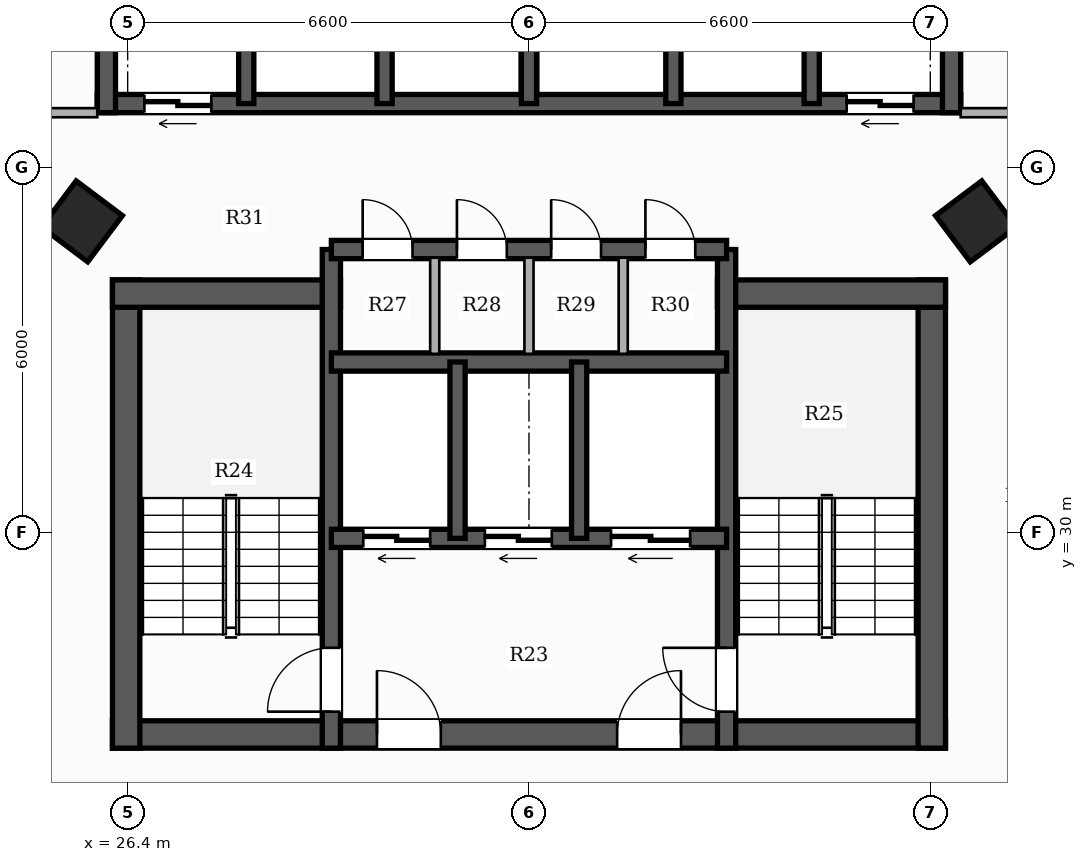
"""IFC4 building model, lengths in metres.
Left out: names, types, materials, properties, quantities, classifications, styles, units other than length and angle.
Written with IfcOpenShell. Run it as: python <this file> out.ifc"""

import sys

from ifc_helpers import new_model, si_unit, direction, frame, frame_2d, origin, origin_2d, place, context, subcontext, project, spatial, rectangle, hollow_rectangle, extrude, element, fill, save


model = new_model("IFC4")
c1 = context("Model", 3, precision=1e-05, world=origin(), true_north=direction((0.0, 1.0)))
c2 = subcontext(c1, "Body", "Model", "MODEL_VIEW")
j1 = project(units=[si_unit("LENGTHUNIT", "METRE"), si_unit("PLANEANGLEUNIT", "RADIAN")], contexts=[c1])
p1 = place(None, origin())
s1 = spatial("IfcSite", under=j1, at=p1, CompositionType="ELEMENT")
p2 = place(p1, origin())
s2 = spatial("IfcBuilding", under=s1, at=p2, CompositionType="ELEMENT")
p3 = place(p2, frame((0.0, 0.0, 46.7)))
s3 = spatial("IfcBuildingStorey", under=s2, at=p3, CompositionType="ELEMENT", Elevation=46.7)
p4 = place(p3, frame((26.15, 26.675, 0.0), z_axis=(0.0, 0.0, 1.0), x_axis=(1.0, 0.0, 0.0)))
e1 = element("IfcWall", 1, at=p4, inside=s3, PredefinedType="SHEAR", context=c2, shape_type="SweptSolid", body=[
    extrude(rectangle(XDim=13.7, YDim=0.45, at=frame_2d((6.85, 0.0))), origin(), (0.0, 0.0, 1.0), 3.3),
])
p5 = place(p4, frame((4.35, 0.0, 0.0)))
e2 = element("IfcOpeningElement", 2, at=p5, cuts=e1, PredefinedType="OPENING", context=c2, shape_type="SweptSolid", body=[
    extrude(rectangle(XDim=1.05, YDim=2.15, at=frame_2d((0.525, 1.075))), frame((0.0, 0.235, 0.0), z_axis=(0.0, -1.0, 0.0), x_axis=(1.0, 0.0, 0.0)), (0.0, 0.0, 1.0), 0.47),
])
p6 = place(p4, frame((8.3, 0.0, 0.0)))
e3 = element("IfcOpeningElement", 3, at=p6, cuts=e1, PredefinedType="OPENING", context=c2, shape_type="SweptSolid", body=[
    extrude(rectangle(XDim=1.05, YDim=2.15, at=frame_2d((0.525, 1.075))), frame((0.0, 0.235, 0.0), z_axis=(0.0, -1.0, 0.0), x_axis=(1.0, 0.0, 0.0)), (0.0, 0.0, 1.0), 0.47),
])
p7 = place(p3, frame((26.375, 26.45, 0.0), z_axis=(0.0, 0.0, 1.0), x_axis=(0.0, 1.0, 0.0)))
e4 = element("IfcWall", 4, at=p7, inside=s3, PredefinedType="SHEAR", context=c2, shape_type="SweptSolid", body=[
    extrude(rectangle(XDim=7.7, YDim=0.45, at=frame_2d((3.85, 0.0))), origin(), (0.0, 0.0, 1.0), 3.3),
])
p8 = place(p3, frame((26.15, 33.925, 0.0), z_axis=(0.0, 0.0, 1.0), x_axis=(1.0, 0.0, 0.0)))
e5 = element("IfcWall", 5, at=p8, inside=s3, PredefinedType="SHEAR", context=c2, shape_type="SweptSolid", body=[
    extrude(rectangle(XDim=3.75, YDim=0.45, at=frame_2d((1.875, 0.0))), origin(), (0.0, 0.0, 1.0), 3.3),
])
p9 = place(p3, frame((39.625, 26.45, 0.0), z_axis=(0.0, 0.0, 1.0), x_axis=(0.0, 1.0, 0.0)))
e6 = element("IfcWall", 6, at=p9, inside=s3, PredefinedType="SHEAR", context=c2, shape_type="SweptSolid", body=[
    extrude(rectangle(XDim=7.7, YDim=0.45, at=frame_2d((3.85, 0.0))), origin(), (0.0, 0.0, 1.0), 3.3),
])
p10 = place(p3, frame((36.1, 33.925, 0.0), z_axis=(0.0, 0.0, 1.0), x_axis=(1.0, 0.0, 0.0)))
e7 = element("IfcWall", 7, at=p10, inside=s3, PredefinedType="SHEAR", context=c2, shape_type="SweptSolid", body=[
    extrude(rectangle(XDim=3.75, YDim=0.45, at=frame_2d((1.875, 0.0))), origin(), (0.0, 0.0, 1.0), 3.3),
])
p11 = place(p3, frame((29.75, 26.45, 0.0), z_axis=(0.0, 0.0, 1.0), x_axis=(0.0, 1.0, 0.0)))
e8 = element("IfcWall", 8, at=p11, inside=s3, PredefinedType="SHEAR", context=c2, shape_type="SweptSolid", body=[
    extrude(rectangle(XDim=8.2, YDim=0.3, at=frame_2d((4.1, 0.0))), origin(), (0.0, 0.0, 1.0), 3.3),
])
p12 = place(p11, frame((0.6, 0.0, 0.0)))
e9 = element("IfcOpeningElement", 9, at=p12, cuts=e8, PredefinedType="OPENING", context=c2, shape_type="SweptSolid", body=[
    extrude(rectangle(XDim=1.05, YDim=2.15, at=frame_2d((0.525, 1.075))), frame((0.0, 0.16, 0.0), z_axis=(0.0, -1.0, 0.0), x_axis=(1.0, 0.0, 0.0)), (0.0, 0.0, 1.0), 0.32),
])
p13 = place(p3, frame((36.25, 26.45, 0.0), z_axis=(0.0, 0.0, 1.0), x_axis=(0.0, 1.0, 0.0)))
e10 = element("IfcWall", 10, at=p13, inside=s3, PredefinedType="SHEAR", context=c2, shape_type="SweptSolid", body=[
    extrude(rectangle(XDim=8.2, YDim=0.3, at=frame_2d((4.1, 0.0))), origin(), (0.0, 0.0, 1.0), 3.3),
])
p14 = place(p13, frame((0.6, 0.0, 0.0)))
e11 = element("IfcOpeningElement", 11, at=p14, cuts=e10, PredefinedType="OPENING", context=c2, shape_type="SweptSolid", body=[
    extrude(rectangle(XDim=1.05, YDim=2.15, at=frame_2d((0.525, 1.075))), frame((0.0, 0.16, 0.0), z_axis=(0.0, -1.0, 0.0), x_axis=(1.0, 0.0, 0.0)), (0.0, 0.0, 1.0), 0.32),
])
p15 = place(p3, frame((36.25, 29.9, 0.0), z_axis=(0.0, 0.0, 1.0), x_axis=(-1.0, 0.0, 0.0)))
e12 = element("IfcWall", 12, at=p15, inside=s3, PredefinedType="SHEAR", context=c2, shape_type="SweptSolid", body=[
    extrude(rectangle(XDim=6.5, YDim=0.3, at=frame_2d((3.25, 0.0))), origin(), (0.0, 0.0, 1.0), 3.3),
])
p16 = place(p15, frame((4.875, 0.0, 0.0)))
e13 = element("IfcOpeningElement", 13, at=p16, cuts=e12, PredefinedType="OPENING", context=c2, shape_type="SweptSolid", body=[
    extrude(rectangle(XDim=1.1, YDim=2.2, at=frame_2d((0.55, 1.1))), frame((0.0, 0.16, 0.0), z_axis=(0.0, -1.0, 0.0), x_axis=(1.0, 0.0, 0.0)), (0.0, 0.0, 1.0), 0.32),
])
p17 = place(p15, frame((2.875, 0.0, 0.0)))
e14 = element("IfcOpeningElement", 14, at=p17, cuts=e12, PredefinedType="OPENING", context=c2, shape_type="SweptSolid", body=[
    extrude(rectangle(XDim=1.1, YDim=2.2, at=frame_2d((0.55, 1.1))), frame((0.0, 0.16, 0.0), z_axis=(0.0, -1.0, 0.0), x_axis=(1.0, 0.0, 0.0)), (0.0, 0.0, 1.0), 0.32),
])
p18 = place(p15, frame((0.6, 0.0, 0.0)))
e15 = element("IfcOpeningElement", 15, at=p18, cuts=e12, PredefinedType="OPENING", context=c2, shape_type="SweptSolid", body=[
    extrude(rectangle(XDim=1.3, YDim=2.2, at=frame_2d((0.65, 1.1))), frame((0.0, 0.16, 0.0), z_axis=(0.0, -1.0, 0.0), x_axis=(1.0, 0.0, 0.0)), (0.0, 0.0, 1.0), 0.32),
])
p19 = place(p3, frame((29.75, 32.8, 0.0), z_axis=(0.0, 0.0, 1.0), x_axis=(1.0, 0.0, 0.0)))
e16 = element("IfcWall", 16, at=p19, inside=s3, PredefinedType="SHEAR", context=c2, shape_type="SweptSolid", body=[
    extrude(rectangle(XDim=6.5, YDim=0.3, at=frame_2d((3.25, 0.0))), origin(), (0.0, 0.0, 1.0), 3.3),
])
for number, where, z_axis, x_axis in (
    (17, (31.825, 29.9, 0.0), (0.0, 0.0, 1.0), (0.0, 1.0, 0.0)),
    (18, (33.825, 29.9, 0.0), (0.0, 0.0, 1.0), (0.0, 1.0, 0.0)),
):
    element("IfcWall", number, at=place(p3, frame(where, z_axis=z_axis, x_axis=x_axis)), inside=s3, PredefinedType="SHEAR", context=c2, shape_type="SweptSolid", body=[
        extrude(rectangle(XDim=2.9, YDim=0.25, at=frame_2d((1.45, 0.0))), origin(), (0.0, 0.0, 1.0), 3.3),
    ])
p20 = place(p3, frame((29.75, 34.65, 0.0), z_axis=(0.0, 0.0, 1.0), x_axis=(1.0, 0.0, 0.0)))
e19 = element("IfcWall", 19, at=p20, inside=s3, PredefinedType="SHEAR", context=c2, shape_type="SweptSolid", body=[
    extrude(rectangle(XDim=6.5, YDim=0.3, at=frame_2d((3.25, 0.0))), origin(), (0.0, 0.0, 1.0), 3.3),
])
p21 = place(p20, frame((0.515, 0.0, 0.0)))
e20 = element("IfcOpeningElement", 20, at=p21, cuts=e19, PredefinedType="OPENING", context=c2, shape_type="SweptSolid", body=[
    extrude(rectangle(XDim=0.82, YDim=2.1, at=frame_2d((0.41, 1.05))), frame((0.0, 0.16, 0.0), z_axis=(0.0, -1.0, 0.0), x_axis=(1.0, 0.0, 0.0)), (0.0, 0.0, 1.0), 0.32),
])
p22 = place(p20, frame((2.065, 0.0, 0.0)))
e21 = element("IfcOpeningElement", 21, at=p22, cuts=e19, PredefinedType="OPENING", context=c2, shape_type="SweptSolid", body=[
    extrude(rectangle(XDim=0.82, YDim=2.1, at=frame_2d((0.41, 1.05))), frame((0.0, 0.16, 0.0), z_axis=(0.0, -1.0, 0.0), x_axis=(1.0, 0.0, 0.0)), (0.0, 0.0, 1.0), 0.32),
])
p23 = place(p20, frame((3.615, 0.0, 0.0)))
e22 = element("IfcOpeningElement", 22, at=p23, cuts=e19, PredefinedType="OPENING", context=c2, shape_type="SweptSolid", body=[
    extrude(rectangle(XDim=0.82, YDim=2.1, at=frame_2d((0.41, 1.05))), frame((0.0, 0.16, 0.0), z_axis=(0.0, -1.0, 0.0), x_axis=(1.0, 0.0, 0.0)), (0.0, 0.0, 1.0), 0.32),
])
p24 = place(p20, frame((5.165, 0.0, 0.0)))
e23 = element("IfcOpeningElement", 23, at=p24, cuts=e19, PredefinedType="OPENING", context=c2, shape_type="SweptSolid", body=[
    extrude(rectangle(XDim=0.82, YDim=2.1, at=frame_2d((0.41, 1.05))), frame((0.0, 0.16, 0.0), z_axis=(0.0, -1.0, 0.0), x_axis=(1.0, 0.0, 0.0)), (0.0, 0.0, 1.0), 0.32),
])
p25 = place(p3, frame((40.1, 37.05, 0.0), z_axis=(0.0, 0.0, 1.0), x_axis=(-1.0, 0.0, 0.0)))
e24 = element("IfcWall", 24, at=p25, inside=s3, PredefinedType="SHEAR", context=c2, shape_type="SweptSolid", body=[
    extrude(rectangle(XDim=14.2, YDim=0.3, at=frame_2d((7.1, 0.0))), origin(), (0.0, 0.0, 1.0), 3.3),
])
p26 = place(p25, frame((12.325, 0.0, 0.0)))
e25 = element("IfcOpeningElement", 25, at=p26, cuts=e24, PredefinedType="OPENING", context=c2, shape_type="SweptSolid", body=[
    extrude(rectangle(XDim=1.1, YDim=2.2, at=frame_2d((0.55, 1.1))), frame((0.0, 0.16, 0.0), z_axis=(0.0, -1.0, 0.0), x_axis=(1.0, 0.0, 0.0)), (0.0, 0.0, 1.0), 0.32),
])
p27 = place(p25, frame((0.775, 0.0, 0.0)))
e26 = element("IfcOpeningElement", 26, at=p27, cuts=e24, PredefinedType="OPENING", context=c2, shape_type="SweptSolid", body=[
    extrude(rectangle(XDim=1.1, YDim=2.2, at=frame_2d((0.55, 1.1))), frame((0.0, 0.16, 0.0), z_axis=(0.0, -1.0, 0.0), x_axis=(1.0, 0.0, 0.0)), (0.0, 0.0, 1.0), 0.32),
])
for number, where, z_axis, x_axis in (
    (27, (26.05, 36.9, 0.0), (0.0, 0.0, 1.0), (0.0, 1.0, 0.0)),
    (28, (39.95, 36.9, 0.0), (0.0, 0.0, 1.0), (0.0, 1.0, 0.0)),
):
    element("IfcWall", number, at=place(p3, frame(where, z_axis=z_axis, x_axis=x_axis)), inside=s3, PredefinedType="SHEAR", context=c2, shape_type="SweptSolid", body=[
        extrude(rectangle(XDim=2.85, YDim=0.3, at=frame_2d((1.425, 0.0))), origin(), (0.0, 0.0, 1.0), 3.3),
    ])
for number, where, z_axis, x_axis in (
    (29, (28.35, 37.05, 0.0), (0.0, 0.0, 1.0), (0.0, 1.0, 0.0)),
    (30, (30.625, 37.05, 0.0), (0.0, 0.0, 1.0), (0.0, 1.0, 0.0)),
    (31, (33.0, 37.05, 0.0), (0.0, 0.0, 1.0), (0.0, 1.0, 0.0)),
    (32, (35.375, 37.05, 0.0), (0.0, 0.0, 1.0), (0.0, 1.0, 0.0)),
    (33, (37.65, 37.05, 0.0), (0.0, 0.0, 1.0), (0.0, 1.0, 0.0)),
):
    element("IfcWall", number, at=place(p3, frame(where, z_axis=z_axis, x_axis=x_axis)), inside=s3, PredefinedType="SHEAR", context=c2, shape_type="SweptSolid", body=[
        extrude(rectangle(XDim=2.55, YDim=0.25, at=frame_2d((1.275, 0.0))), origin(), (0.0, 0.0, 1.0), 3.3),
    ])
for number, where, z_axis, x_axis in (
    (34, (25.648, 35.113, 0.0), (0.0, 0.0, 1.0), (0.6, 0.8, 0.0)),
    (35, (40.352, 35.113, 0.0), (0.0, 0.0, 1.0), (-0.6, 0.8, 0.0)),
):
    element("IfcColumn", number, at=place(p3, frame(where, z_axis=z_axis, x_axis=x_axis)), inside=s3, PredefinedType="COLUMN", context=c2, shape_type="SweptSolid", body=[
        extrude(hollow_rectangle(XDim=0.95, YDim=0.95, WallThickness=0.032, at=origin_2d()), origin(), (0.0, 0.0, 1.0), 3.3),
    ])
for number, where, z_axis, x_axis in (
    (36, (31.45, 32.935, 0.0), (0.0, 0.0, 1.0), (0.0, 1.0, 0.0)),
    (37, (33.0, 32.935, 0.0), (0.0, 0.0, 1.0), (0.0, 1.0, 0.0)),
    (38, (34.55, 32.935, 0.0), (0.0, 0.0, 1.0), (0.0, 1.0, 0.0)),
):
    element("IfcWall", number, at=place(p3, frame(where, z_axis=z_axis, x_axis=x_axis)), inside=s3, PredefinedType="PARTITIONING", context=c2, shape_type="SweptSolid", body=[
        extrude(rectangle(XDim=1.58, YDim=0.15, at=frame_2d((0.79, 0.0))), origin(), (0.0, 0.0, 1.0), 3.06),
    ])
p28 = place(p3, frame((40.1, 36.9, 0.0), z_axis=(0.0, 0.0, 1.0), x_axis=(1.0, 0.0, 0.0)))
e39 = element("IfcWall", 39, at=p28, inside=s3, PredefinedType="PARTITIONING", context=c2, shape_type="SweptSolid", body=[
    extrude(rectangle(XDim=2.55, YDim=0.15, at=frame_2d((1.275, 0.0))), origin(), (0.0, 0.0, 1.0), 2.413),
])
p29 = place(p3, frame((23.41, 36.9, 0.0), z_axis=(0.0, 0.0, 1.0), x_axis=(1.0, 0.0, 0.0)))
e40 = element("IfcWall", 40, at=p29, inside=s3, PredefinedType="PARTITIONING", context=c2, shape_type="SweptSolid", body=[
    extrude(rectangle(XDim=2.49, YDim=0.15, at=frame_2d((1.245, 0.0))), origin(), (0.0, 0.0, 1.0), 2.413),
])
p30 = place(p12, origin())
e41 = element("IfcDoor", 41, at=p30, inside=s3, OperationType="SINGLE_SWING_LEFT", PredefinedType="DOOR", context=c2, shape_type="SweptSolid", body=[
    extrude(rectangle(XDim=1.05, YDim=2.15, at=frame_2d((0.525, 1.075))), frame((0.0, 0.025, 0.0), z_axis=(0.0, -1.0, 0.0), x_axis=(1.0, 0.0, 0.0)), (0.0, 0.0, 1.0), 0.05),
])
fill(e9, e41)
p31 = place(p14, origin())
e42 = element("IfcDoor", 42, at=p31, inside=s3, OperationType="SINGLE_SWING_RIGHT", PredefinedType="DOOR", context=c2, shape_type="SweptSolid", body=[
    extrude(rectangle(XDim=1.05, YDim=2.15, at=frame_2d((0.525, 1.075))), frame((0.0, 0.025, 0.0), z_axis=(0.0, -1.0, 0.0), x_axis=(1.0, 0.0, 0.0)), (0.0, 0.0, 1.0), 0.05),
])
fill(e11, e42)
p32 = place(p5, origin())
e43 = element("IfcDoor", 43, at=p32, inside=s3, OperationType="SINGLE_SWING_LEFT", PredefinedType="DOOR", context=c2, shape_type="SweptSolid", body=[
    extrude(rectangle(XDim=1.05, YDim=2.15, at=frame_2d((0.525, 1.075))), frame((0.0, 0.025, 0.0), z_axis=(0.0, -1.0, 0.0), x_axis=(1.0, 0.0, 0.0)), (0.0, 0.0, 1.0), 0.05),
])
fill(e2, e43)
p33 = place(p6, origin())
e44 = element("IfcDoor", 44, at=p33, inside=s3, OperationType="SINGLE_SWING_RIGHT", PredefinedType="DOOR", context=c2, shape_type="SweptSolid", body=[
    extrude(rectangle(XDim=1.05, YDim=2.15, at=frame_2d((0.525, 1.075))), frame((0.0, 0.025, 0.0), z_axis=(0.0, -1.0, 0.0), x_axis=(1.0, 0.0, 0.0)), (0.0, 0.0, 1.0), 0.05),
])
fill(e3, e44)
p34 = place(p16, origin())
e45 = element("IfcDoor", 45, at=p34, inside=s3, OperationType="DOUBLE_DOOR_SLIDING", PredefinedType="DOOR", context=c2, shape_type="SweptSolid", body=[
    extrude(rectangle(XDim=1.1, YDim=2.2, at=frame_2d((0.55, 1.1))), frame((0.0, 0.025, 0.0), z_axis=(0.0, -1.0, 0.0), x_axis=(1.0, 0.0, 0.0)), (0.0, 0.0, 1.0), 0.05),
])
fill(e13, e45)
p35 = place(p17, origin())
e46 = element("IfcDoor", 46, at=p35, inside=s3, OperationType="DOUBLE_DOOR_SLIDING", PredefinedType="DOOR", context=c2, shape_type="SweptSolid", body=[
    extrude(rectangle(XDim=1.1, YDim=2.2, at=frame_2d((0.55, 1.1))), frame((0.0, 0.025, 0.0), z_axis=(0.0, -1.0, 0.0), x_axis=(1.0, 0.0, 0.0)), (0.0, 0.0, 1.0), 0.05),
])
fill(e14, e46)
p36 = place(p18, origin())
e47 = element("IfcDoor", 47, at=p36, inside=s3, OperationType="DOUBLE_DOOR_SLIDING", PredefinedType="DOOR", context=c2, shape_type="SweptSolid", body=[
    extrude(rectangle(XDim=1.3, YDim=2.2, at=frame_2d((0.65, 1.1))), frame((0.0, 0.025, 0.0), z_axis=(0.0, -1.0, 0.0), x_axis=(1.0, 0.0, 0.0)), (0.0, 0.0, 1.0), 0.05),
])
fill(e15, e47)
p37 = place(p26, origin())
e48 = element("IfcDoor", 48, at=p37, inside=s3, OperationType="DOUBLE_DOOR_SLIDING", PredefinedType="DOOR", context=c2, shape_type="SweptSolid", body=[
    extrude(rectangle(XDim=1.1, YDim=2.2, at=frame_2d((0.55, 1.1))), frame((0.0, 0.025, 0.0), z_axis=(0.0, -1.0, 0.0), x_axis=(1.0, 0.0, 0.0)), (0.0, 0.0, 1.0), 0.05),
])
fill(e25, e48)
p38 = place(p27, origin())
e49 = element("IfcDoor", 49, at=p38, inside=s3, OperationType="DOUBLE_DOOR_SLIDING", PredefinedType="DOOR", context=c2, shape_type="SweptSolid", body=[
    extrude(rectangle(XDim=1.1, YDim=2.2, at=frame_2d((0.55, 1.1))), frame((0.0, 0.025, 0.0), z_axis=(0.0, -1.0, 0.0), x_axis=(1.0, 0.0, 0.0)), (0.0, 0.0, 1.0), 0.05),
])
fill(e26, e49)
p39 = place(p21, origin())
e50 = element("IfcDoor", 50, at=p39, inside=s3, OperationType="SINGLE_SWING_LEFT", PredefinedType="DOOR", context=c2, shape_type="SweptSolid", body=[
    extrude(rectangle(XDim=0.82, YDim=2.1, at=frame_2d((0.41, 1.05))), frame((0.0, 0.025, 0.0), z_axis=(0.0, -1.0, 0.0), x_axis=(1.0, 0.0, 0.0)), (0.0, 0.0, 1.0), 0.05),
])
fill(e20, e50)
p40 = place(p22, origin())
e51 = element("IfcDoor", 51, at=p40, inside=s3, OperationType="SINGLE_SWING_LEFT", PredefinedType="DOOR", context=c2, shape_type="SweptSolid", body=[
    extrude(rectangle(XDim=0.82, YDim=2.1, at=frame_2d((0.41, 1.05))), frame((0.0, 0.025, 0.0), z_axis=(0.0, -1.0, 0.0), x_axis=(1.0, 0.0, 0.0)), (0.0, 0.0, 1.0), 0.05),
])
fill(e21, e51)
p41 = place(p23, origin())
e52 = element("IfcDoor", 52, at=p41, inside=s3, OperationType="SINGLE_SWING_LEFT", PredefinedType="DOOR", context=c2, shape_type="SweptSolid", body=[
    extrude(rectangle(XDim=0.82, YDim=2.1, at=frame_2d((0.41, 1.05))), frame((0.0, 0.025, 0.0), z_axis=(0.0, -1.0, 0.0), x_axis=(1.0, 0.0, 0.0)), (0.0, 0.0, 1.0), 0.05),
])
fill(e22, e52)
p42 = place(p24, origin())
e53 = element("IfcDoor", 53, at=p42, inside=s3, OperationType="SINGLE_SWING_LEFT", PredefinedType="DOOR", context=c2, shape_type="SweptSolid", body=[
    extrude(rectangle(XDim=0.82, YDim=2.1, at=frame_2d((0.41, 1.05))), frame((0.0, 0.025, 0.0), z_axis=(0.0, -1.0, 0.0), x_axis=(1.0, 0.0, 0.0)), (0.0, 0.0, 1.0), 0.05),
])
fill(e23, e53)
save(model, sys.argv[1])
